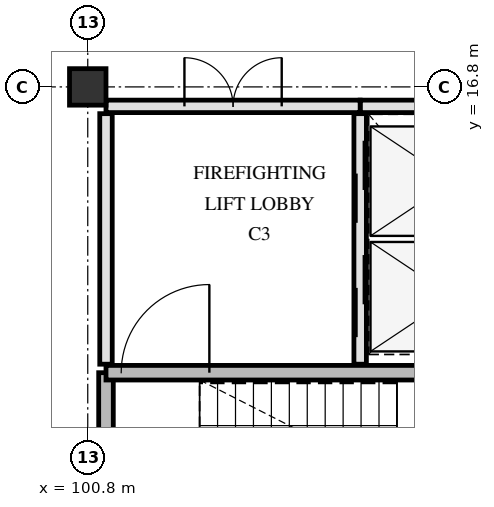
"""IFC4 building model, lengths in metres.
Left out: names, types, materials, properties, quantities, classifications, styles, units other than length and angle.
Written with IfcOpenShell. Run it as: python <this file> out.ifc"""

import sys

from ifc_helpers import new_model, si_unit, direction, frame, frame_2d, origin, origin_2d, place, context, subcontext, project, spatial, rectangle, extrude, element, fill, save


model = new_model("IFC4")
c1 = context("Model", 3, precision=1e-05, world=origin(), true_north=direction((0.0, 1.0)))
c2 = subcontext(c1, "Body", "Model", "MODEL_VIEW")
j1 = project(units=[si_unit("LENGTHUNIT", "METRE"), si_unit("PLANEANGLEUNIT", "RADIAN")], contexts=[c1])
p1 = place(None, origin())
s1 = spatial("IfcSite", under=j1, at=p1, CompositionType="ELEMENT")
p2 = place(p1, origin())
s2 = spatial("IfcBuilding", under=s1, at=p2, CompositionType="ELEMENT")
p3 = place(p2, frame((0.0, 0.0, 22.5)))
s3 = spatial("IfcBuildingStorey", under=s2, at=p3, CompositionType="ELEMENT", Elevation=22.5)
p4 = place(p3, frame((100.8, 16.8, 0.0), z_axis=(0.0, 0.0, 1.0), x_axis=(1.0, 0.0, 0.0)))
e1 = element("IfcColumn", 1, at=p4, inside=s3, PredefinedType="COLUMN", context=c2, shape_type="SweptSolid", body=[
    extrude(rectangle(XDim=0.6, YDim=0.6, at=origin_2d()), origin(), (0.0, 0.0, 1.0), 3.9),
])
p5 = place(p3, frame((101.1, 8.78, 0.0), z_axis=(0.0, 0.0, 1.0), x_axis=(0.0, 1.0, 0.0)))
e2 = element("IfcWall", 2, at=p5, inside=s3, PredefinedType="SHEAR", context=c2, shape_type="SweptSolid", body=[
    extrude(rectangle(XDim=3.32, YDim=0.24, at=frame_2d((1.66, 0.0))), origin(), (0.0, 0.0, 1.0), 3.62),
])
p6 = place(p3, frame((101.1, 12.1, 0.0), z_axis=(0.0, 0.0, 1.0), x_axis=(1.0, 0.0, 0.0)))
e3 = element("IfcWall", 3, at=p6, inside=s3, PredefinedType="SHEAR", context=c2, shape_type="SweptSolid", body=[
    extrude(rectangle(XDim=7.82, YDim=0.24, at=frame_2d((3.91, 0.0))), origin(), (0.0, 0.0, 1.0), 3.62),
])
p7 = place(p6, frame((0.25, 0.0, 0.0)))
e4 = element("IfcOpeningElement", 4, at=p7, cuts=e3, PredefinedType="OPENING", context=c2, shape_type="SweptSolid", body=[
    extrude(rectangle(XDim=1.45, YDim=2.2, at=frame_2d((0.725, 1.1))), frame((0.0, 0.13, 0.0), z_axis=(0.0, -1.0, 0.0), x_axis=(1.0, 0.0, 0.0)), (0.0, 0.0, 1.0), 0.26),
])
p8 = place(p3, frame((105.28, 12.24, 0.0), z_axis=(0.0, 0.0, 1.0), x_axis=(0.0, 1.0, 0.0)))
e5 = element("IfcWall", 5, at=p8, inside=s3, PredefinedType="PARTITIONING", context=c2, shape_type="SweptSolid", body=[
    extrude(rectangle(XDim=4.12, YDim=0.205, at=frame_2d((2.06, 0.0))), origin(), (0.0, 0.0, 1.0), 3.61),
])
p9 = place(p8, frame((0.445, 0.0, 0.0)))
e6 = element("IfcOpeningElement", 6, at=p9, cuts=e5, PredefinedType="OPENING", context=c2, shape_type="SweptSolid", body=[
    extrude(rectangle(XDim=1.35, YDim=2.2, at=frame_2d((0.675, 1.1))), frame((0.0, 0.113, 0.0), z_axis=(0.0, -1.0, 0.0), x_axis=(1.0, 0.0, 0.0)), (0.0, 0.0, 1.0), 0.225),
])
p10 = place(p8, frame((2.325, 0.0, 0.0)))
e7 = element("IfcOpeningElement", 7, at=p10, cuts=e5, PredefinedType="OPENING", context=c2, shape_type="SweptSolid", body=[
    extrude(rectangle(XDim=1.35, YDim=2.2, at=frame_2d((0.675, 1.1))), frame((0.0, 0.113, 0.0), z_axis=(0.0, -1.0, 0.0), x_axis=(1.0, 0.0, 0.0)), (0.0, 0.0, 1.0), 0.225),
])
p11 = place(p3, frame((105.28, 16.48, 0.0), z_axis=(0.0, 0.0, 1.0), x_axis=(1.0, 0.0, 0.0)))
e8 = element("IfcWall", 8, at=p11, inside=s3, PredefinedType="PARTITIONING", context=c2, shape_type="SweptSolid", body=[
    extrude(rectangle(XDim=3.57, YDim=0.205, at=frame_2d((1.785, 0.0))), origin(), (0.0, 0.0, 1.0), 3.61),
])
p12 = place(p3, frame((101.1, 12.24, 0.0), z_axis=(0.0, 0.0, 1.0), x_axis=(0.0, 1.0, 0.0)))
e9 = element("IfcWall", 9, at=p12, inside=s3, PredefinedType="PARTITIONING", context=c2, shape_type="SweptSolid", body=[
    extrude(rectangle(XDim=4.12, YDim=0.205, at=frame_2d((2.06, 0.0))), origin(), (0.0, 0.0, 1.0), 3.61),
])
p13 = place(p3, frame((101.1, 16.48, 0.0), z_axis=(0.0, 0.0, 1.0), x_axis=(1.0, 0.0, 0.0)))
e10 = element("IfcWall", 10, at=p13, inside=s3, PredefinedType="PARTITIONING", context=c2, shape_type="SweptSolid", body=[
    extrude(rectangle(XDim=4.18, YDim=0.205, at=frame_2d((2.09, 0.0))), origin(), (0.0, 0.0, 1.0), 3.61),
])
p14 = place(p13, frame((1.29, 0.0, 0.0)))
e11 = element("IfcOpeningElement", 11, at=p14, cuts=e10, PredefinedType="OPENING", context=c2, shape_type="SweptSolid", body=[
    extrude(rectangle(XDim=1.6, YDim=2.25, at=frame_2d((0.8, 1.125))), frame((0.0, 0.113, 0.0), z_axis=(0.0, -1.0, 0.0), x_axis=(1.0, 0.0, 0.0)), (0.0, 0.0, 1.0), 0.225),
])
p15 = place(p7, origin())
e12 = element("IfcDoor", 12, at=p15, inside=s3, OperationType="SINGLE_SWING_RIGHT", PredefinedType="DOOR", context=c2, shape_type="SweptSolid", body=[
    extrude(rectangle(XDim=1.45, YDim=2.2, at=frame_2d((0.725, 1.1))), frame((0.0, 0.025, 0.0), z_axis=(0.0, -1.0, 0.0), x_axis=(1.0, 0.0, 0.0)), (0.0, 0.0, 1.0), 0.05),
])
fill(e4, e12)
p16 = place(p9, origin())
e13 = element("IfcDoor", 13, at=p16, inside=s3, OperationType="SLIDING_TO_LEFT", PredefinedType="DOOR", context=c2, shape_type="SweptSolid", body=[
    extrude(rectangle(XDim=1.35, YDim=2.2, at=frame_2d((0.675, 1.1))), frame((0.0, 0.025, 0.0), z_axis=(0.0, -1.0, 0.0), x_axis=(1.0, 0.0, 0.0)), (0.0, 0.0, 1.0), 0.05),
])
fill(e6, e13)
p17 = place(p10, origin())
e14 = element("IfcDoor", 14, at=p17, inside=s3, OperationType="SLIDING_TO_LEFT", PredefinedType="DOOR", context=c2, shape_type="SweptSolid", body=[
    extrude(rectangle(XDim=1.35, YDim=2.2, at=frame_2d((0.675, 1.1))), frame((0.0, 0.025, 0.0), z_axis=(0.0, -1.0, 0.0), x_axis=(1.0, 0.0, 0.0)), (0.0, 0.0, 1.0), 0.05),
])
fill(e7, e14)
p18 = place(p14, origin())
e15 = element("IfcDoor", 15, at=p18, inside=s3, OperationType="DOUBLE_SWING_LEFT", PredefinedType="DOOR", context=c2, shape_type="SweptSolid", body=[
    extrude(rectangle(XDim=1.6, YDim=2.25, at=frame_2d((0.8, 1.125))), frame((0.0, 0.025, 0.0), z_axis=(0.0, -1.0, 0.0), x_axis=(1.0, 0.0, 0.0)), (0.0, 0.0, 1.0), 0.05),
])
fill(e11, e15)
save(model, sys.argv[1])
